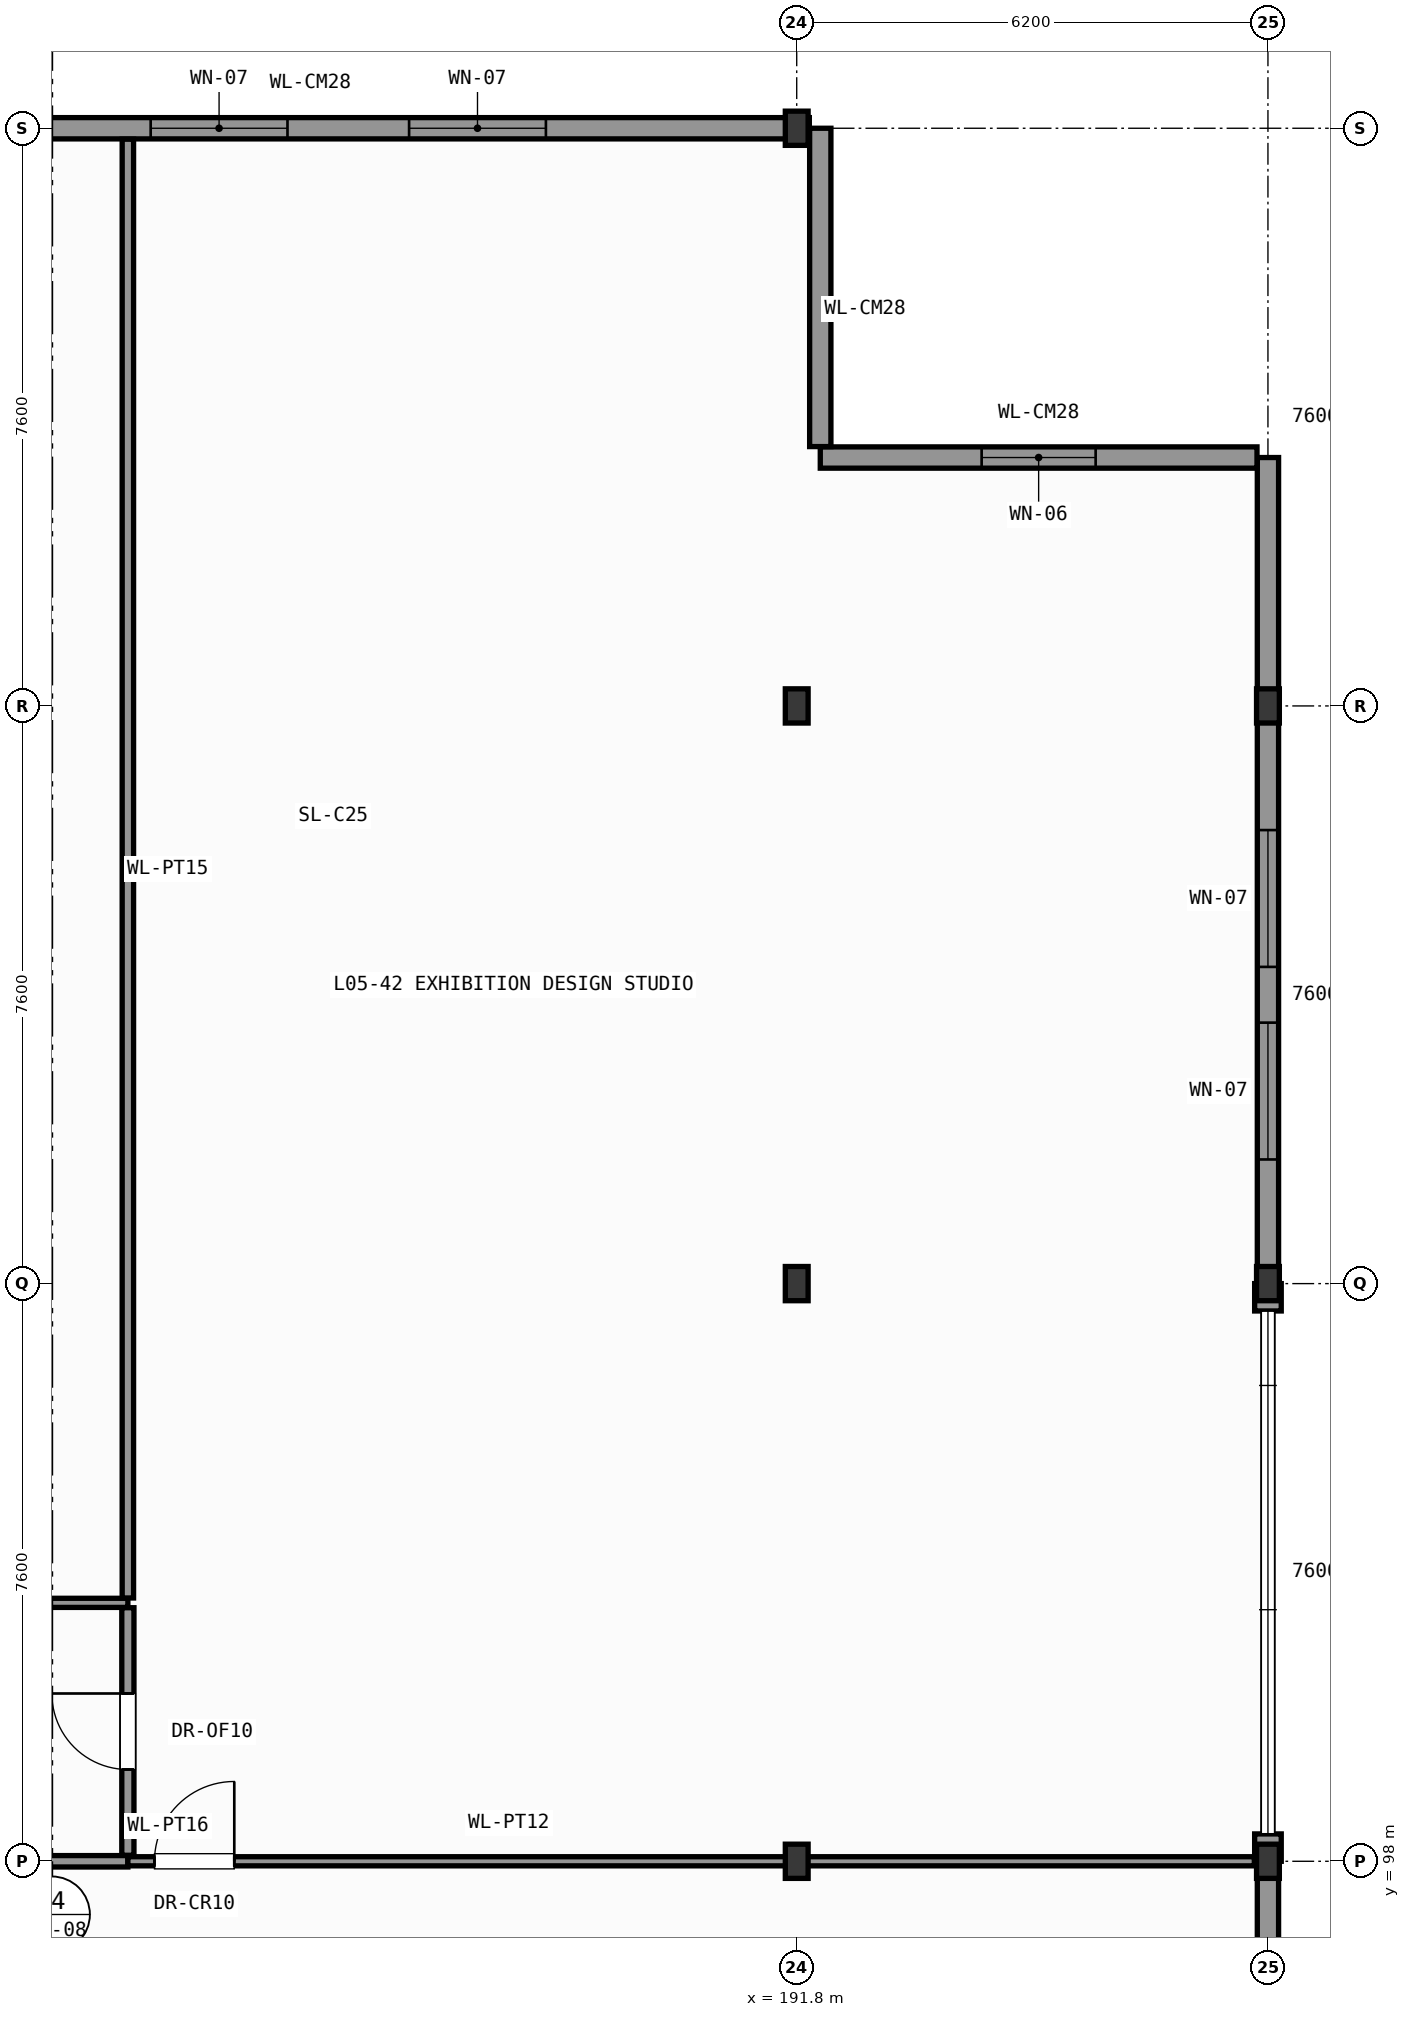
"""IFC4 building model, lengths in metres.
Left out: names, types, materials, properties, quantities, classifications, styles, units other than length and angle.
Written with IfcOpenShell. Run it as: python <this file> out.ifc"""

import sys

from ifc_helpers import new_model, si_unit, direction, frame, frame_2d, origin, origin_2d, place, context, subcontext, project, spatial, rectangle, i_section, extrude, element, fill, save


model = new_model("IFC4")
c1 = context("Model", 3, precision=1e-05, world=origin(), true_north=direction((0.0, 1.0)))
c2 = subcontext(c1, "Body", "Model", "MODEL_VIEW")
j1 = project(units=[si_unit("LENGTHUNIT", "METRE"), si_unit("PLANEANGLEUNIT", "RADIAN")], contexts=[c1])
p1 = place(None, origin())
s1 = spatial("IfcSite", under=j1, at=p1, CompositionType="ELEMENT")
p2 = place(p1, origin())
s2 = spatial("IfcBuilding", under=s1, at=p2, CompositionType="ELEMENT")
p3 = place(p2, frame((0.0, 0.0, 22.2)))
s3 = spatial("IfcBuildingStorey", under=s2, at=p3, CompositionType="ELEMENT", Elevation=22.2)
for number, where, z_axis, x_axis in (
    (1, (191.8, 98.0, 0.0), (0.0, 0.0, 1.0), (1.0, 0.0, 0.0)),
    (2, (191.8, 105.6, 0.0), (0.0, 0.0, 1.0), (1.0, 0.0, 0.0)),
    (3, (191.8, 113.2, 0.0), (0.0, 0.0, 1.0), (1.0, 0.0, 0.0)),
    (4, (191.8, 120.8, 0.0), (0.0, 0.0, 1.0), (1.0, 0.0, 0.0)),
    (5, (198.0, 98.0, 0.0), (0.0, 0.0, 1.0), (1.0, 0.0, 0.0)),
    (6, (198.0, 105.6, 0.0), (0.0, 0.0, 1.0), (1.0, 0.0, 0.0)),
    (7, (198.0, 113.2, 0.0), (0.0, 0.0, 1.0), (1.0, 0.0, 0.0)),
):
    element("IfcColumn", number, at=place(p3, frame(where, z_axis=z_axis, x_axis=x_axis)), inside=s3, PredefinedType="COLUMN", context=c2, shape_type="SweptSolid", body=[
        extrude(i_section(OverallWidth=0.3, OverallDepth=0.45, WebThickness=0.014, FlangeThickness=0.026, FilletRadius=0.027, at=origin_2d()), origin(), (0.0, 0.0, 1.0), 4.2),
    ])
p4 = place(p3, frame((198.0, 98.0, 0.0), z_axis=(0.0, 0.0, 1.0), x_axis=(0.0, -1.0, 0.0)))
e8 = element("IfcWall", 8, at=p4, inside=s3, PredefinedType="SOLIDWALL", context=c2, shape_type="SweptSolid", body=[
    extrude(rectangle(XDim=7.6, YDim=0.28, at=frame_2d((3.8, 0.0))), origin(), (0.0, 0.0, 1.0), 3.675),
])
p5 = place(p4, frame((1.483, 0.0, 0.95)))
e9 = element("IfcOpeningElement", 9, at=p5, cuts=e8, PredefinedType="OPENING", context=c2, shape_type="SweptSolid", body=[
    extrude(rectangle(XDim=2.1, YDim=2.33, at=frame_2d((1.05, 1.165))), frame((0.0, 0.15, 0.0), z_axis=(0.0, -1.0, 0.0), x_axis=(1.0, 0.0, 0.0)), (0.0, 0.0, 1.0), 0.3),
])
p6 = place(p4, frame((4.017, 0.0, 0.95)))
e10 = element("IfcOpeningElement", 10, at=p6, cuts=e8, PredefinedType="OPENING", context=c2, shape_type="SweptSolid", body=[
    extrude(rectangle(XDim=2.1, YDim=2.33, at=frame_2d((1.05, 1.165))), frame((0.0, 0.15, 0.0), z_axis=(0.0, -1.0, 0.0), x_axis=(1.0, 0.0, 0.0)), (0.0, 0.0, 1.0), 0.3),
])
for number, where, z_axis, x_axis in (
    (11, (198.0, 98.0, 0.0), (0.0, 0.0, 1.0), (0.0, 1.0, 0.0)),
    (12, (198.0, 105.24, 0.0), (0.0, 0.0, 1.0), (0.0, 1.0, 0.0)),
):
    element("IfcWall", number, at=place(p3, frame(where, z_axis=z_axis, x_axis=x_axis)), inside=s3, PredefinedType="SOLIDWALL", context=c2, shape_type="SweptSolid", body=[
        extrude(rectangle(XDim=0.36, YDim=0.35, at=frame_2d((0.18, 0.0))), origin(), (0.0, 0.0, 1.0), 3.675),
    ])
p7 = place(p3, frame((198.0, 113.2, 0.0), z_axis=(0.0, 0.0, 1.0), x_axis=(0.0, -1.0, 0.0)))
e13 = element("IfcWall", 13, at=p7, inside=s3, PredefinedType="SOLIDWALL", context=c2, shape_type="SweptSolid", body=[
    extrude(rectangle(XDim=7.6, YDim=0.28, at=frame_2d((3.8, 0.0))), origin(), (0.0, 0.0, 1.0), 3.675),
])
p8 = place(p7, frame((1.633, 0.0, 0.95)))
e14 = element("IfcOpeningElement", 14, at=p8, cuts=e13, PredefinedType="OPENING", context=c2, shape_type="SweptSolid", body=[
    extrude(rectangle(XDim=1.8, YDim=2.33, at=frame_2d((0.9, 1.165))), frame((0.0, 0.15, 0.0), z_axis=(0.0, -1.0, 0.0), x_axis=(1.0, 0.0, 0.0)), (0.0, 0.0, 1.0), 0.3),
])
p9 = place(p7, frame((4.167, 0.0, 0.95)))
e15 = element("IfcOpeningElement", 15, at=p9, cuts=e13, PredefinedType="OPENING", context=c2, shape_type="SweptSolid", body=[
    extrude(rectangle(XDim=1.8, YDim=2.33, at=frame_2d((0.9, 1.165))), frame((0.0, 0.15, 0.0), z_axis=(0.0, -1.0, 0.0), x_axis=(1.0, 0.0, 0.0)), (0.0, 0.0, 1.0), 0.3),
])
p10 = place(p3, frame((198.0, 116.468, 0.0), z_axis=(0.0, 0.0, 1.0), x_axis=(0.0, -1.0, 0.0)))
e16 = element("IfcWall", 16, at=p10, inside=s3, PredefinedType="SOLIDWALL", context=c2, shape_type="SweptSolid", body=[
    extrude(rectangle(XDim=3.268, YDim=0.28, at=frame_2d((1.634, 0.0))), origin(), (0.0, 0.0, 1.0), 3.98),
])
p11 = place(p3, frame((192.11, 116.468, 0.0), z_axis=(0.0, 0.0, 1.0), x_axis=(1.0, 0.0, 0.0)))
e17 = element("IfcWall", 17, at=p11, inside=s3, PredefinedType="SOLIDWALL", context=c2, shape_type="SweptSolid", body=[
    extrude(rectangle(XDim=5.746, YDim=0.28, at=frame_2d((2.873, 0.0))), origin(), (0.0, 0.0, 1.0), 3.98),
])
p12 = place(p11, frame((2.123, 0.0, 0.95)))
e18 = element("IfcOpeningElement", 18, at=p12, cuts=e17, PredefinedType="OPENING", context=c2, shape_type="SweptSolid", body=[
    extrude(rectangle(XDim=1.5, YDim=2.4, at=frame_2d((0.75, 1.2))), frame((0.0, 0.15, 0.0), z_axis=(0.0, -1.0, 0.0), x_axis=(1.0, 0.0, 0.0)), (0.0, 0.0, 1.0), 0.3),
])
p13 = place(p3, frame((192.11, 120.8, 0.0), z_axis=(0.0, 0.0, 1.0), x_axis=(0.0, -1.0, 0.0)))
e19 = element("IfcWall", 19, at=p13, inside=s3, PredefinedType="SOLIDWALL", context=c2, shape_type="SweptSolid", body=[
    extrude(rectangle(XDim=4.188, YDim=0.28, at=frame_2d((2.094, 0.0))), origin(), (0.0, 0.0, 1.0), 3.675),
])
p14 = place(p3, frame((179.0, 120.8, 0.0), z_axis=(0.0, 0.0, 1.0), x_axis=(1.0, 0.0, 0.0)))
e20 = element("IfcWall", 20, at=p14, inside=s3, PredefinedType="SOLIDWALL", context=c2, shape_type="SweptSolid", body=[
    extrude(rectangle(XDim=12.966, YDim=0.28, at=frame_2d((6.483, 0.0))), origin(), (0.0, 0.0, 1.0), 3.415),
])
p15 = place(p14, frame((4.3, 0.0, 0.95)))
e21 = element("IfcOpeningElement", 21, at=p15, cuts=e20, PredefinedType="OPENING", context=c2, shape_type="SweptSolid", body=[
    extrude(rectangle(XDim=1.8, YDim=2.06, at=frame_2d((0.9, 1.03))), frame((0.0, 0.15, 0.0), z_axis=(0.0, -1.0, 0.0), x_axis=(1.0, 0.0, 0.0)), (0.0, 0.0, 1.0), 0.3),
])
p16 = place(p14, frame((7.7, 0.0, 0.95)))
e22 = element("IfcOpeningElement", 22, at=p16, cuts=e20, PredefinedType="OPENING", context=c2, shape_type="SweptSolid", body=[
    extrude(rectangle(XDim=1.8, YDim=2.06, at=frame_2d((0.9, 1.03))), frame((0.0, 0.15, 0.0), z_axis=(0.0, -1.0, 0.0), x_axis=(1.0, 0.0, 0.0)), (0.0, 0.0, 1.0), 0.3),
])
p17 = place(p3, frame((170.464, 98.0, 0.0), z_axis=(0.0, 0.0, 1.0), x_axis=(1.0, 0.0, 0.0)))
e23 = element("IfcWall", 23, at=p17, inside=s3, PredefinedType="PARTITIONING", context=c2, shape_type="SweptSolid", body=[
    extrude(rectangle(XDim=12.536, YDim=0.15, at=frame_2d((6.268, 0.0))), origin(), (0.0, 0.0, 1.0), 3.415),
])
p18 = place(p17, frame((5.793, 0.0, 0.0)))
e24 = element("IfcOpeningElement", 24, at=p18, cuts=e23, PredefinedType="OPENING", context=c2, shape_type="SweptSolid", body=[
    extrude(rectangle(XDim=0.95, YDim=2.1, at=frame_2d((0.475, 1.05))), frame((0.0, 0.085, 0.0), z_axis=(0.0, -1.0, 0.0), x_axis=(1.0, 0.0, 0.0)), (0.0, 0.0, 1.0), 0.17),
])
p19 = place(p3, frame((183.0, 98.0, 0.0), z_axis=(0.0, 0.0, 1.0), x_axis=(1.0, 0.0, 0.0)))
e25 = element("IfcWall", 25, at=p19, inside=s3, PredefinedType="PARTITIONING", context=c2, shape_type="SweptSolid", body=[
    extrude(rectangle(XDim=14.821, YDim=0.12, at=frame_2d((7.411, 0.0))), origin(), (0.0, 0.0, 1.0), 3.315),
])
p20 = place(p19, frame((0.35, 0.0, 0.0)))
e26 = element("IfcOpeningElement", 26, at=p20, cuts=e25, PredefinedType="OPENING", context=c2, shape_type="SweptSolid", body=[
    extrude(rectangle(XDim=1.05, YDim=2.2, at=frame_2d((0.525, 1.1))), frame((0.0, 0.07, 0.0), z_axis=(0.0, -1.0, 0.0), x_axis=(1.0, 0.0, 0.0)), (0.0, 0.0, 1.0), 0.14),
])
p21 = place(p3, frame((170.479, 101.4, 0.0), z_axis=(0.0, 0.0, 1.0), x_axis=(1.0, 0.0, 0.0)))
e27 = element("IfcWall", 27, at=p21, inside=s3, PredefinedType="PARTITIONING", context=c2, shape_type="SweptSolid", body=[
    extrude(rectangle(XDim=12.521, YDim=0.12, at=frame_2d((6.26, 0.0))), origin(), (0.0, 0.0, 1.0), 3.98),
])
p22 = place(p21, frame((5.535, 0.0, 0.0)))
e28 = element("IfcOpeningElement", 28, at=p22, cuts=e27, PredefinedType="OPENING", context=c2, shape_type="SweptSolid", body=[
    extrude(rectangle(XDim=1.45, YDim=2.35, at=frame_2d((0.725, 1.175))), frame((0.0, 0.07, 0.0), z_axis=(0.0, -1.0, 0.0), x_axis=(1.0, 0.0, 0.0)), (0.0, 0.0, 1.0), 0.14),
])
p23 = place(p3, frame((183.0, 98.079, 0.0), z_axis=(0.0, 0.0, 1.0), x_axis=(0.0, 1.0, 0.0)))
e29 = element("IfcWall", 29, at=p23, inside=s3, PredefinedType="PARTITIONING", context=c2, shape_type="SweptSolid", body=[
    extrude(rectangle(XDim=3.257, YDim=0.16, at=frame_2d((1.628, 0.0))), origin(), (0.0, 0.0, 1.0), 3.98),
])
p24 = place(p23, frame((1.128, 0.0, 0.0)))
e30 = element("IfcOpeningElement", 30, at=p24, cuts=e29, PredefinedType="OPENING", context=c2, shape_type="SweptSolid", body=[
    extrude(rectangle(XDim=1.0, YDim=2.15, at=frame_2d((0.5, 1.075))), frame((0.0, 0.09, 0.0), z_axis=(0.0, -1.0, 0.0), x_axis=(1.0, 0.0, 0.0)), (0.0, 0.0, 1.0), 0.18),
])
p25 = place(p3, frame((183.0, 101.464, 0.0), z_axis=(0.0, 0.0, 1.0), x_axis=(0.0, 1.0, 0.0)))
e31 = element("IfcWall", 31, at=p25, inside=s3, PredefinedType="PARTITIONING", context=c2, shape_type="SweptSolid", body=[
    extrude(rectangle(XDim=19.192, YDim=0.15, at=frame_2d((9.596, 0.0))), origin(), (0.0, 0.0, 1.0), 3.98),
])
p26 = place(p8, origin())
e32 = element("IfcWindow", 32, at=p26, inside=s3, PartitioningType="SINGLE_PANEL", PredefinedType="WINDOW", context=c2, shape_type="SweptSolid", body=[
    extrude(rectangle(XDim=1.8, YDim=2.33, at=frame_2d((0.9, 1.165))), frame((0.0, 0.03, 0.0), z_axis=(0.0, -1.0, 0.0), x_axis=(1.0, 0.0, 0.0)), (0.0, 0.0, 1.0), 0.06),
])
fill(e14, e32)
p27 = place(p9, origin())
e33 = element("IfcWindow", 33, at=p27, inside=s3, PartitioningType="SINGLE_PANEL", PredefinedType="WINDOW", context=c2, shape_type="SweptSolid", body=[
    extrude(rectangle(XDim=1.8, YDim=2.33, at=frame_2d((0.9, 1.165))), frame((0.0, 0.03, 0.0), z_axis=(0.0, -1.0, 0.0), x_axis=(1.0, 0.0, 0.0)), (0.0, 0.0, 1.0), 0.06),
])
fill(e15, e33)
p28 = place(p12, origin())
e34 = element("IfcWindow", 34, at=p28, inside=s3, PartitioningType="SINGLE_PANEL", PredefinedType="WINDOW", context=c2, shape_type="SweptSolid", body=[
    extrude(rectangle(XDim=1.5, YDim=2.4, at=frame_2d((0.75, 1.2))), frame((0.0, 0.03, 0.0), z_axis=(0.0, -1.0, 0.0), x_axis=(1.0, 0.0, 0.0)), (0.0, 0.0, 1.0), 0.06),
])
fill(e18, e34)
p29 = place(p15, origin())
e35 = element("IfcWindow", 35, at=p29, inside=s3, PartitioningType="SINGLE_PANEL", PredefinedType="WINDOW", context=c2, shape_type="SweptSolid", body=[
    extrude(rectangle(XDim=1.8, YDim=2.06, at=frame_2d((0.9, 1.03))), frame((0.0, 0.03, 0.0), z_axis=(0.0, -1.0, 0.0), x_axis=(1.0, 0.0, 0.0)), (0.0, 0.0, 1.0), 0.06),
])
fill(e21, e35)
p30 = place(p16, origin())
e36 = element("IfcWindow", 36, at=p30, inside=s3, PartitioningType="SINGLE_PANEL", PredefinedType="WINDOW", context=c2, shape_type="SweptSolid", body=[
    extrude(rectangle(XDim=1.8, YDim=2.06, at=frame_2d((0.9, 1.03))), frame((0.0, 0.03, 0.0), z_axis=(0.0, -1.0, 0.0), x_axis=(1.0, 0.0, 0.0)), (0.0, 0.0, 1.0), 0.06),
])
fill(e22, e36)
p31 = place(p20, origin())
e37 = element("IfcDoor", 37, at=p31, inside=s3, OperationType="SINGLE_SWING_RIGHT", PredefinedType="DOOR", context=c2, shape_type="SweptSolid", body=[
    extrude(rectangle(XDim=1.05, YDim=2.2, at=frame_2d((0.525, 1.1))), frame((0.0, 0.025, 0.0), z_axis=(0.0, -1.0, 0.0), x_axis=(1.0, 0.0, 0.0)), (0.0, 0.0, 1.0), 0.05),
])
fill(e26, e37)
p32 = place(p24, origin())
e38 = element("IfcDoor", 38, at=p32, inside=s3, OperationType="SINGLE_SWING_RIGHT", PredefinedType="DOOR", context=c2, shape_type="SweptSolid", body=[
    extrude(rectangle(XDim=1.0, YDim=2.15, at=frame_2d((0.5, 1.075))), frame((0.0, 0.025, 0.0), z_axis=(0.0, -1.0, 0.0), x_axis=(1.0, 0.0, 0.0)), (0.0, 0.0, 1.0), 0.05),
])
fill(e30, e38)
save(model, sys.argv[1])
